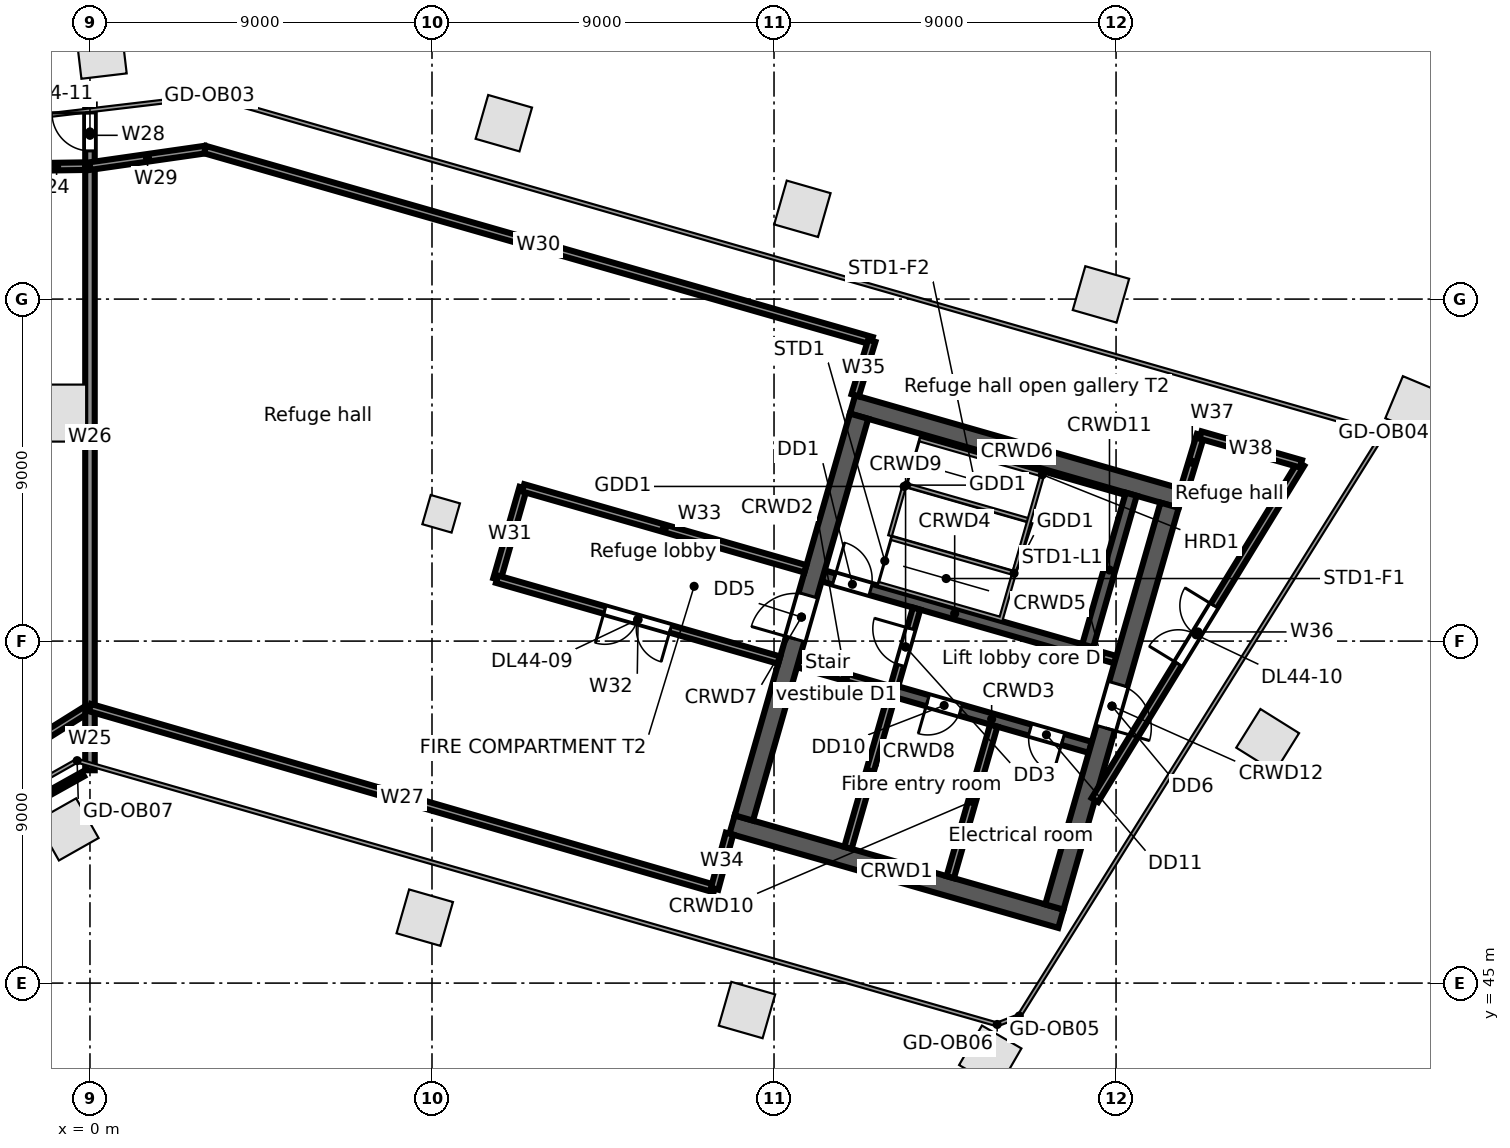
"""IFC4 building model, lengths in metres.
Left out: names, types, materials, properties, quantities, classifications, styles, units other than length and angle.
Written with IfcOpenShell. Run it as: python <this file> out.ifc"""

import sys

from ifc_helpers import new_model, si_unit, direction, frame, frame_2d, origin, origin_2d, place, context, subcontext, project, spatial, rectangle, extrude, element, fill, save


model = new_model("IFC4")
c1 = context("Model", 3, precision=1e-05, world=origin(), true_north=direction((0.0, 1.0)))
c2 = subcontext(c1, "Body", "Model", "MODEL_VIEW")
j1 = project(units=[si_unit("LENGTHUNIT", "METRE"), si_unit("PLANEANGLEUNIT", "RADIAN")], contexts=[c1])
p1 = place(None, origin())
s1 = spatial("IfcSite", under=j1, at=p1, CompositionType="ELEMENT")
p2 = place(p1, origin())
s2 = spatial("IfcBuilding", under=s1, at=p2, CompositionType="ELEMENT")
p3 = place(p2, frame((0.0, 0.0, 202.9)))
s3 = spatial("IfcBuildingStorey", under=s2, at=p3, CompositionType="ELEMENT", Elevation=202.9)
for number, where, z_axis, x_axis in (
    (1, (26.603, 63.124, 0.0), (0.0, 0.0, 1.0), (-0.961, 0.276, 0.0)),
    (2, (18.746, 65.376, 0.0), (0.0, 0.0, 1.0), (-0.961, 0.276, 0.0)),
    (3, (10.89, 67.629, 0.0), (0.0, 0.0, 1.0), (-0.961, 0.276, 0.0)),
    (4, (0.3, 69.464, 0.0), (0.0, 0.0, 1.0), (-0.993, -0.118, 0.0)),
    (5, (-0.591, 49.044, 0.0), (0.0, 0.0, 1.0), (0.87, 0.492, 0.0)),
    (6, (8.81, 46.722, 0.0), (0.0, 0.0, 1.0), (0.961, -0.276, 0.0)),
    (7, (17.288, 44.291, 0.0), (0.0, 0.0, 1.0), (0.961, -0.276, 0.0)),
    (8, (23.69, 43.063, 0.0), (0.0, 0.0, 1.0), (-0.865, 0.501, 0.0)),
    (9, (30.99, 51.386, 0.0), (0.0, 0.0, 1.0), (0.53, 0.848, 0.0)),
    (10, (34.87, 60.187, 0.0), (0.0, 0.0, 1.0), (-0.923, 0.385, 0.0)),
):
    element("IfcColumn", number, at=place(p3, frame(where, z_axis=z_axis, x_axis=x_axis)), inside=s3, PredefinedType="COLUMN", context=c2, shape_type="SweptSolid", body=[
        extrude(rectangle(XDim=1.2, YDim=1.2, at=origin_2d()), origin(), (0.0, 0.0, 1.0), 4.6),
    ])
p4 = place(p3, frame((-0.85, 60.0, 0.0), z_axis=(0.0, 0.0, 1.0), x_axis=(0.0, 1.0, 0.0)))
e11 = element("IfcColumn", 11, at=p4, inside=s3, PredefinedType="COLUMN", context=c2, shape_type="SweptSolid", body=[
    extrude(rectangle(XDim=1.5, YDim=1.5, at=origin_2d()), origin(), (0.0, 0.0, 1.0), 4.6),
])
p5 = place(p3, frame((9.241, 57.35, 0.0), z_axis=(0.0, 0.0, 1.0), x_axis=(0.961261695938, -0.275637355817, 0.0)))
e12 = element("IfcColumn", 12, at=p5, inside=s3, PredefinedType="COLUMN", context=c2, shape_type="SweptSolid", body=[
    extrude(rectangle(XDim=0.8, YDim=0.8, at=origin_2d()), origin(), (0.0, 0.0, 1.0), 4.6),
])
p6 = place(p3, frame((16.897, 49.173, 0.0), z_axis=(0.0, 0.0, 1.0), x_axis=(0.96126248289, -0.275634611374, 0.0)))
e13 = element("IfcWall", 13, at=p6, inside=s3, PredefinedType="SOLIDWALL", context=c2, shape_type="SweptSolid", body=[
    extrude(rectangle(XDim=9.0, YDim=0.5, at=frame_2d((4.5, 0.0))), origin(), (0.0, 0.0, 1.0), 4.32),
])
p7 = place(p3, frame((18.632, 53.409, 0.0), z_axis=(0.0, 0.0, 1.0), x_axis=(0.961247078216, -0.275688328772, 0.0)))
e14 = element("IfcWall", 14, at=p7, inside=s3, PredefinedType="SOLIDWALL", context=c2, shape_type="SweptSolid", body=[
    extrude(rectangle(XDim=2.6, YDim=0.2, at=frame_2d((1.3, 0.0))), origin(), (0.0, 0.0, 1.0), 4.32),
])
p8 = place(p3, frame((21.131, 52.692, 0.0), z_axis=(0.0, 0.0, 1.0), x_axis=(0.961271043721, -0.27560475414, 0.0)))
e15 = element("IfcWall", 15, at=p8, inside=s3, PredefinedType="SOLIDWALL", context=c2, shape_type="SweptSolid", body=[
    extrude(rectangle(XDim=5.4, YDim=0.3, at=frame_2d((2.7, 0.0))), origin(), (0.0, 0.0, 1.0), 4.32),
])
p9 = place(p8, frame((0.95, 0.0, 0.0)))
e16 = element("IfcOpeningElement", 16, at=p9, cuts=e15, PredefinedType="OPENING", context=c2, shape_type="SweptSolid", body=[
    extrude(rectangle(XDim=0.9, YDim=2.1, at=frame_2d((0.45, 1.05))), frame((0.0, 0.16, 0.0), z_axis=(0.0, -1.0, 0.0), x_axis=(1.0, 0.0, 0.0)), (0.0, 0.0, 1.0), 0.32),
])
p10 = place(p8, frame((3.75, 0.0, 0.0)))
e17 = element("IfcOpeningElement", 17, at=p10, cuts=e15, PredefinedType="OPENING", context=c2, shape_type="SweptSolid", body=[
    extrude(rectangle(XDim=0.9, YDim=2.1, at=frame_2d((0.45, 1.05))), frame((0.0, 0.16, 0.0), z_axis=(0.0, -1.0, 0.0), x_axis=(1.0, 0.0, 0.0)), (0.0, 0.0, 1.0), 0.32),
])
p11 = place(p3, frame((19.293, 55.716, 0.0), z_axis=(0.0, 0.0, 1.0), x_axis=(0.96125862491, -0.275648065539, 0.0)))
e18 = element("IfcWall", 18, at=p11, inside=s3, PredefinedType="SOLIDWALL", context=c2, shape_type="SweptSolid", body=[
    extrude(rectangle(XDim=7.2, YDim=0.3, at=frame_2d((3.6, 0.0))), origin(), (0.0, 0.0, 1.0), 4.32),
])
p12 = place(p11, frame((0.3, 0.0, 0.0)))
e19 = element("IfcOpeningElement", 19, at=p12, cuts=e18, PredefinedType="OPENING", context=c2, shape_type="SweptSolid", body=[
    extrude(rectangle(XDim=1.0, YDim=2.1, at=frame_2d((0.5, 1.05))), frame((0.0, 0.16, 0.0), z_axis=(0.0, -1.0, 0.0), x_axis=(1.0, 0.0, 0.0)), (0.0, 0.0, 1.0), 0.32),
])
p13 = place(p3, frame((26.214, 53.732, 0.0), z_axis=(0.0, 0.0, 1.0), x_axis=(0.961200870072, -0.275849392554, 0.0)))
e20 = element("IfcWall", 20, at=p13, inside=s3, PredefinedType="SOLIDWALL", context=c2, shape_type="SweptSolid", body=[
    extrude(rectangle(XDim=0.8, YDim=0.2, at=frame_2d((0.4, 0.0))), origin(), (0.0, 0.0, 1.0), 4.32),
])
p14 = place(p3, frame((20.067, 60.228, 0.0), z_axis=(0.0, 0.0, 1.0), x_axis=(0.96126248289, -0.275634611374, 0.0)))
e21 = element("IfcWall", 21, at=p14, inside=s3, PredefinedType="SOLIDWALL", context=c2, shape_type="SweptSolid", body=[
    extrude(rectangle(XDim=9.0, YDim=0.5, at=frame_2d((4.5, 0.0))), origin(), (0.0, 0.0, 1.0), 4.32),
])
p15 = place(p3, frame((17.206, 49.344, 0.0), z_axis=(0.0, 0.0, 1.0), x_axis=(0.275632651182, 0.961263044958, 0.0)))
e22 = element("IfcWall", 22, at=p15, inside=s3, PredefinedType="SOLIDWALL", context=c2, shape_type="SweptSolid", body=[
    extrude(rectangle(XDim=11.0, YDim=0.5, at=frame_2d((5.5, 0.0))), origin(), (0.0, 0.0, 1.0), 4.32),
])
p16 = place(p15, frame((4.9, 0.0, 0.0)))
e23 = element("IfcOpeningElement", 23, at=p16, cuts=e22, PredefinedType="OPENING", context=c2, shape_type="SweptSolid", body=[
    extrude(rectangle(XDim=1.2, YDim=2.1, at=frame_2d((0.6, 1.05))), frame((0.0, 0.26, 0.0), z_axis=(0.0, -1.0, 0.0), x_axis=(1.0, 0.0, 0.0)), (0.0, 0.0, 1.0), 0.52),
])
p17 = place(p3, frame((19.946, 48.559, 0.0), z_axis=(0.0, 0.0, 1.0), x_axis=(0.275668905258, 0.961252648721, 0.0)))
e24 = element("IfcWall", 24, at=p17, inside=s3, PredefinedType="SOLIDWALL", context=c2, shape_type="SweptSolid", body=[
    extrude(rectangle(XDim=4.15, YDim=0.2, at=frame_2d((2.075, 0.0))), origin(), (0.0, 0.0, 1.0), 4.32),
])
p18 = place(p3, frame((21.172, 52.837, 0.0), z_axis=(0.0, 0.0, 1.0), x_axis=(0.275657676022, 0.961255868981, 0.0)))
e25 = element("IfcWall", 25, at=p18, inside=s3, PredefinedType="PARTITIONING", context=c2, shape_type="SweptSolid", body=[
    extrude(rectangle(XDim=2.1, YDim=0.2, at=frame_2d((1.05, 0.0))), origin(), (0.0, 0.0, 1.0), 4.32),
])
p19 = place(p18, frame((0.55, 0.0, 0.0)))
e26 = element("IfcOpeningElement", 26, at=p19, cuts=e25, PredefinedType="OPENING", context=c2, shape_type="SweptSolid", body=[
    extrude(rectangle(XDim=1.0, YDim=2.1, at=frame_2d((0.5, 1.05))), frame((0.0, 0.11, 0.0), z_axis=(0.0, -1.0, 0.0), x_axis=(1.0, 0.0, 0.0)), (0.0, 0.0, 1.0), 0.22),
])
p20 = place(p3, frame((22.637, 47.787, 0.0), z_axis=(0.0, 0.0, 1.0), x_axis=(0.275614546295, 0.961268236171, 0.0)))
e27 = element("IfcWall", 27, at=p20, inside=s3, PredefinedType="PARTITIONING", context=c2, shape_type="SweptSolid", body=[
    extrude(rectangle(XDim=4.15, YDim=0.2, at=frame_2d((2.075, 0.0))), origin(), (0.0, 0.0, 1.0), 4.32),
])
p21 = place(p3, frame((26.256, 53.876, 0.0), z_axis=(0.0, 0.0, 1.0), x_axis=(0.275614546295, 0.961268236171, 0.0)))
e28 = element("IfcWall", 28, at=p21, inside=s3, PredefinedType="SOLIDWALL", context=c2, shape_type="SweptSolid", body=[
    extrude(rectangle(XDim=4.15, YDim=0.3, at=frame_2d((2.075, 0.0))), origin(), (0.0, 0.0, 1.0), 4.32),
])
p22 = place(p3, frame((25.377, 47.002, 0.0), z_axis=(0.0, 0.0, 1.0), x_axis=(0.275632651182, 0.961263044958, 0.0)))
e29 = element("IfcWall", 29, at=p22, inside=s3, PredefinedType="SOLIDWALL", context=c2, shape_type="SweptSolid", body=[
    extrude(rectangle(XDim=11.0, YDim=0.5, at=frame_2d((5.5, 0.0))), origin(), (0.0, 0.0, 1.0), 4.32),
])
p23 = place(p22, frame((4.9, 0.0, 0.0)))
e30 = element("IfcOpeningElement", 30, at=p23, cuts=e29, PredefinedType="OPENING", context=c2, shape_type="SweptSolid", body=[
    extrude(rectangle(XDim=1.2, YDim=2.1, at=frame_2d((0.6, 1.05))), frame((0.0, 0.26, 0.0), z_axis=(0.0, -1.0, 0.0), x_axis=(1.0, 0.0, 0.0)), (0.0, 0.0, 1.0), 0.52),
])
p24 = place(p3, frame((-14.169, 42.684, 0.0), z_axis=(0.0, 0.0, 1.0), x_axis=(0.872958370826, 0.487794713793, 0.0)))
e31 = element("IfcWall", 31, at=p24, inside=s3, PredefinedType="PARTITIONING", context=c2, shape_type="SweptSolid", body=[
    extrude(rectangle(XDim=16.019, YDim=0.125, at=frame_2d((8.01, 0.0))), origin(), (0.0, 0.0, 1.0), 3.5),
])
p25 = place(p3, frame((-4.821, 49.23, 0.0), z_axis=(0.0, 0.0, 1.0), x_axis=(0.847455386679, 0.530866619396, 0.0)))
e32 = element("IfcWall", 32, at=p25, inside=s3, PredefinedType="PARTITIONING", context=c2, shape_type="SweptSolid", body=[
    extrude(rectangle(XDim=5.689, YDim=0.2, at=frame_2d((2.844, 0.0))), origin(), (0.0, 0.0, 1.0), 3.5),
])
p26 = place(p3, frame((-1.757, 66.474, 0.0), z_axis=(0.0, 0.0, 1.0), x_axis=(0.999891555363, 0.014726761827, 0.0)))
e33 = element("IfcWall", 33, at=p26, inside=s3, PredefinedType="PARTITIONING", context=c2, shape_type="SweptSolid", body=[
    extrude(rectangle(XDim=1.757, YDim=0.2, at=frame_2d((0.879, 0.0))), origin(), (0.0, 0.0, 1.0), 3.6),
])
p27 = place(p3, frame((0.0, 50.601, 0.0), z_axis=(0.0, 0.0, 1.0), x_axis=(0.0, 1.0, 0.0)))
e34 = element("IfcWall", 34, at=p27, inside=s3, PredefinedType="PARTITIONING", context=c2, shape_type="SweptSolid", body=[
    extrude(rectangle(XDim=1.649, YDim=0.25, at=frame_2d((0.824, 0.0))), origin(), (0.0, 0.0, 1.0), 4.32),
])
p28 = place(p3, frame((0.0, 52.25, 0.0), z_axis=(0.0, 0.0, 1.0), x_axis=(0.0, 1.0, 0.0)))
e35 = element("IfcWall", 35, at=p28, inside=s3, PredefinedType="PARTITIONING", context=c2, shape_type="SweptSolid", body=[
    extrude(rectangle(XDim=14.25, YDim=0.25, at=frame_2d((7.125, 0.0))), origin(), (0.0, 0.0, 1.0), 3.5),
])
p29 = place(p3, frame((0.0, 52.25, 0.0), z_axis=(0.0, 0.0, 1.0), x_axis=(0.960438830998, -0.278491026628, 0.0)))
e36 = element("IfcWall", 36, at=p29, inside=s3, PredefinedType="PARTITIONING", context=c2, shape_type="SweptSolid", body=[
    extrude(rectangle(XDim=17.114, YDim=0.2, at=frame_2d((8.557, 0.0))), origin(), (0.0, 0.0, 1.0), 3.5),
])
p30 = place(p3, frame((0.0, 66.5, 0.0), z_axis=(0.0, 0.0, 1.0), x_axis=(0.0, 1.0, 0.0)))
e37 = element("IfcWall", 37, at=p30, inside=s3, PredefinedType="PARTITIONING", context=c2, shape_type="SweptSolid", body=[
    extrude(rectangle(XDim=1.62, YDim=0.25, at=frame_2d((0.81, 0.0))), origin(), (0.0, 0.0, 1.0), 3.6),
])
p31 = place(p30, frame((0.4, 0.0, 0.0)))
e38 = element("IfcOpeningElement", 38, at=p31, cuts=e37, PredefinedType="OPENING", context=c2, shape_type="SweptSolid", body=[
    extrude(rectangle(XDim=1.0, YDim=2.1, at=frame_2d((0.5, 1.05))), frame((0.0, 0.135, 0.0), z_axis=(0.0, -1.0, 0.0), x_axis=(1.0, 0.0, 0.0)), (0.0, 0.0, 1.0), 0.27),
])
p32 = place(p3, frame((0.0, 66.5, 0.0), z_axis=(0.0, 0.0, 1.0), x_axis=(0.989887165849, 0.1418569663, 0.0)))
e39 = element("IfcWall", 39, at=p32, inside=s3, PredefinedType="PARTITIONING", context=c2, shape_type="SweptSolid", body=[
    extrude(rectangle(XDim=3.06, YDim=0.2, at=frame_2d((1.53, 0.0))), origin(), (0.0, 0.0, 1.0), 3.5),
])
p33 = place(p3, frame((3.029, 66.934, 0.0), z_axis=(0.0, 0.0, 1.0), x_axis=(0.961266574638, -0.2756203412, 0.0)))
e40 = element("IfcWall", 40, at=p33, inside=s3, PredefinedType="PARTITIONING", context=c2, shape_type="SweptSolid", body=[
    extrude(rectangle(XDim=18.25, YDim=0.2, at=frame_2d((9.125, 0.0))), origin(), (0.0, 0.0, 1.0), 3.492),
])
p34 = place(p3, frame((10.71, 55.629, 0.0), z_axis=(0.0, 0.0, 1.0), x_axis=(0.275598116036, 0.961272946898, 0.0)))
e41 = element("IfcWall", 41, at=p34, inside=s3, PredefinedType="PARTITIONING", context=c2, shape_type="SweptSolid", body=[
    extrude(rectangle(XDim=2.5, YDim=0.2, at=frame_2d((1.25, 0.0))), origin(), (0.0, 0.0, 1.0), 3.5),
])
p35 = place(p3, frame((10.71, 55.629, 0.0), z_axis=(0.0, 0.0, 1.0), x_axis=(0.96125400461, -0.275664177253, 0.0)))
e42 = element("IfcWall", 42, at=p35, inside=s3, PredefinedType="PARTITIONING", context=c2, shape_type="SweptSolid", body=[
    extrude(rectangle(XDim=7.726, YDim=0.2, at=frame_2d((3.863, 0.0))), origin(), (0.0, 0.0, 1.0), 3.5),
])
p36 = place(p35, frame((2.95, 0.0, 0.0)))
e43 = element("IfcOpeningElement", 43, at=p36, cuts=e42, PredefinedType="OPENING", context=c2, shape_type="SweptSolid", body=[
    extrude(rectangle(XDim=1.8, YDim=2.1, at=frame_2d((0.9, 1.05))), frame((0.0, 0.11, 0.0), z_axis=(0.0, -1.0, 0.0), x_axis=(1.0, 0.0, 0.0)), (0.0, 0.0, 1.0), 0.22),
])
p37 = place(p3, frame((11.399, 58.032, 0.0), z_axis=(0.0, 0.0, 1.0), x_axis=(0.96125400461, -0.275664177253, 0.0)))
e44 = element("IfcWall", 44, at=p37, inside=s3, PredefinedType="PARTITIONING", context=c2, shape_type="SweptSolid", body=[
    extrude(rectangle(XDim=7.726, YDim=0.2, at=frame_2d((3.863, 0.0))), origin(), (0.0, 0.0, 1.0), 3.5),
])
p38 = place(p3, frame((16.437, 47.484, 0.0), z_axis=(0.0, 0.0, 1.0), x_axis=(0.260405090968, 0.965499450335, 0.0)))
e45 = element("IfcWall", 45, at=p38, inside=s3, PredefinedType="PARTITIONING", context=c2, shape_type="SweptSolid", body=[
    extrude(rectangle(XDim=1.501, YDim=0.2, at=frame_2d((0.75, 0.0))), origin(), (0.0, 0.0, 1.0), 4.32),
])
p39 = place(p3, frame((20.136, 60.468, 0.0), z_axis=(0.0, 0.0, 1.0), x_axis=(0.290540119102, 0.956862811061, 0.0)))
e46 = element("IfcWall", 46, at=p39, inside=s3, PredefinedType="PARTITIONING", context=c2, shape_type="SweptSolid", body=[
    extrude(rectangle(XDim=1.501, YDim=0.2, at=frame_2d((0.75, 0.0))), origin(), (0.0, 0.0, 1.0), 4.32),
])
p40 = place(p3, frame((26.444, 49.817, 0.0), z_axis=(0.0, 0.0, 1.0), x_axis=(0.522479302965, 0.852651967671, 0.0)))
e47 = element("IfcWall", 47, at=p40, inside=s3, PredefinedType="PARTITIONING", context=c2, shape_type="SweptSolid", body=[
    extrude(rectangle(XDim=10.377, YDim=0.2, at=frame_2d((5.188, 0.0))), origin(), (0.0, 0.0, 1.0), 3.9),
])
p41 = place(p40, frame((4.2, 0.0, 0.0)))
e48 = element("IfcOpeningElement", 48, at=p41, cuts=e47, PredefinedType="OPENING", context=c2, shape_type="SweptSolid", body=[
    extrude(rectangle(XDim=1.8, YDim=2.1, at=frame_2d((0.9, 1.05))), frame((0.0, 0.11, 0.0), z_axis=(0.0, -1.0, 0.0), x_axis=(1.0, 0.0, 0.0)), (0.0, 0.0, 1.0), 0.22),
])
p42 = place(p3, frame((28.787, 57.987, 0.0), z_axis=(0.0, 0.0, 1.0), x_axis=(0.290391164202, 0.9569080268, 0.0)))
e49 = element("IfcWall", 49, at=p42, inside=s3, PredefinedType="PARTITIONING", context=c2, shape_type="SweptSolid", body=[
    extrude(rectangle(XDim=1.501, YDim=0.2, at=frame_2d((0.75, 0.0))), origin(), (0.0, 0.0, 1.0), 4.32),
])
p43 = place(p3, frame((29.223, 59.423, 0.0), z_axis=(0.0, 0.0, 1.0), x_axis=(0.961245356611, -0.27569433145, 0.0)))
e50 = element("IfcWall", 50, at=p43, inside=s3, PredefinedType="PARTITIONING", context=c2, shape_type="SweptSolid", body=[
    extrude(rectangle(XDim=2.75, YDim=0.2, at=frame_2d((1.375, 0.0))), origin(), (0.0, 0.0, 1.0), 4.32),
])
p44 = place(p12, origin())
e51 = element("IfcDoor", 51, at=p44, inside=s3, OperationType="SINGLE_SWING_LEFT", PredefinedType="DOOR", context=c2, shape_type="SweptSolid", body=[
    extrude(rectangle(XDim=1.0, YDim=2.1, at=frame_2d((0.5, 1.05))), frame((0.0, 0.025, 0.0), z_axis=(0.0, -1.0, 0.0), x_axis=(1.0, 0.0, 0.0)), (0.0, 0.0, 1.0), 0.05),
])
fill(e19, e51)
p45 = place(p19, origin())
e52 = element("IfcDoor", 52, at=p45, inside=s3, OperationType="SINGLE_SWING_RIGHT", PredefinedType="DOOR", context=c2, shape_type="SweptSolid", body=[
    extrude(rectangle(XDim=1.0, YDim=2.1, at=frame_2d((0.5, 1.05))), frame((0.0, 0.025, 0.0), z_axis=(0.0, -1.0, 0.0), x_axis=(1.0, 0.0, 0.0)), (0.0, 0.0, 1.0), 0.05),
])
fill(e26, e52)
p46 = place(p16, origin())
e53 = element("IfcDoor", 53, at=p46, inside=s3, OperationType="SINGLE_SWING_LEFT", PredefinedType="DOOR", context=c2, shape_type="SweptSolid", body=[
    extrude(rectangle(XDim=1.2, YDim=2.1, at=frame_2d((0.6, 1.05))), frame((0.0, 0.025, 0.0), z_axis=(0.0, -1.0, 0.0), x_axis=(1.0, 0.0, 0.0)), (0.0, 0.0, 1.0), 0.05),
])
fill(e23, e53)
p47 = place(p23, frame((1.2, 0.0, 0.0), z_axis=(0.0, 0.0, 1.0), x_axis=(-1.0, 0.0, 0.0)))
e54 = element("IfcDoor", 54, at=p47, inside=s3, OperationType="SINGLE_SWING_RIGHT", PredefinedType="DOOR", context=c2, shape_type="SweptSolid", body=[
    extrude(rectangle(XDim=1.2, YDim=2.1, at=frame_2d((0.6, 1.05))), frame((0.0, 0.025, 0.0), z_axis=(0.0, -1.0, 0.0), x_axis=(1.0, 0.0, 0.0)), (0.0, 0.0, 1.0), 0.05),
])
fill(e30, e54)
p48 = place(p9, frame((0.9, 0.0, 0.0), z_axis=(0.0, 0.0, 1.0), x_axis=(-1.0, 0.0, 0.0)))
e55 = element("IfcDoor", 55, at=p48, inside=s3, OperationType="SINGLE_SWING_RIGHT", PredefinedType="DOOR", context=c2, shape_type="SweptSolid", body=[
    extrude(rectangle(XDim=0.9, YDim=2.1, at=frame_2d((0.45, 1.05))), frame((0.0, 0.025, 0.0), z_axis=(0.0, -1.0, 0.0), x_axis=(1.0, 0.0, 0.0)), (0.0, 0.0, 1.0), 0.05),
])
fill(e16, e55)
p49 = place(p10, frame((0.9, 0.0, 0.0), z_axis=(0.0, 0.0, 1.0), x_axis=(-1.0, 0.0, 0.0)))
e56 = element("IfcDoor", 56, at=p49, inside=s3, OperationType="SINGLE_SWING_LEFT", PredefinedType="DOOR", context=c2, shape_type="SweptSolid", body=[
    extrude(rectangle(XDim=0.9, YDim=2.1, at=frame_2d((0.45, 1.05))), frame((0.0, 0.025, 0.0), z_axis=(0.0, -1.0, 0.0), x_axis=(1.0, 0.0, 0.0)), (0.0, 0.0, 1.0), 0.05),
])
fill(e17, e56)
p50 = place(p36, frame((1.8, 0.0, 0.0), z_axis=(0.0, 0.0, 1.0), x_axis=(-1.0, 0.0, 0.0)))
e57 = element("IfcDoor", 57, at=p50, inside=s3, OperationType="DOUBLE_DOOR_SINGLE_SWING", PredefinedType="DOOR", context=c2, shape_type="SweptSolid", body=[
    extrude(rectangle(XDim=1.8, YDim=2.1, at=frame_2d((0.9, 1.05))), frame((0.0, 0.025, 0.0), z_axis=(0.0, -1.0, 0.0), x_axis=(1.0, 0.0, 0.0)), (0.0, 0.0, 1.0), 0.05),
])
fill(e43, e57)
p51 = place(p41, origin())
e58 = element("IfcDoor", 58, at=p51, inside=s3, OperationType="DOUBLE_DOOR_SINGLE_SWING", PredefinedType="DOOR", context=c2, shape_type="SweptSolid", body=[
    extrude(rectangle(XDim=1.8, YDim=2.1, at=frame_2d((0.9, 1.05))), frame((0.0, 0.025, 0.0), z_axis=(0.0, -1.0, 0.0), x_axis=(1.0, 0.0, 0.0)), (0.0, 0.0, 1.0), 0.05),
])
fill(e48, e58)
p52 = place(p31, origin())
e59 = element("IfcDoor", 59, at=p52, inside=s3, OperationType="SINGLE_SWING_RIGHT", PredefinedType="DOOR", context=c2, shape_type="SweptSolid", body=[
    extrude(rectangle(XDim=1.0, YDim=2.1, at=frame_2d((0.5, 1.05))), frame((0.0, 0.025, 0.0), z_axis=(0.0, -1.0, 0.0), x_axis=(1.0, 0.0, 0.0)), (0.0, 0.0, 1.0), 0.05),
])
fill(e38, e59)
save(model, sys.argv[1])
